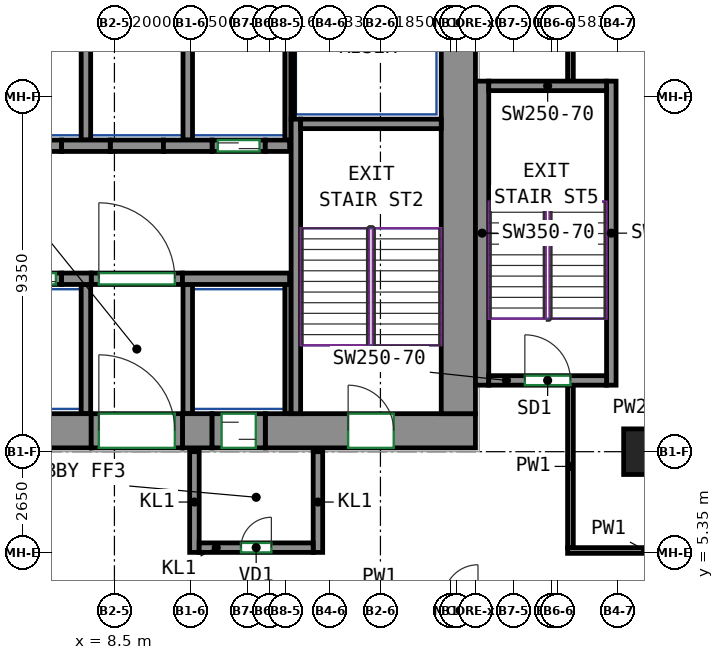
"""IFC4 building model, lengths in metres.
Left out: names, types, materials, properties, quantities, classifications, styles, units other than length and angle.
Written with IfcOpenShell. Run it as: python <this file> out.ifc"""

import sys

from ifc_helpers import new_model, si_unit, direction, frame, frame_2d, origin, origin_2d, place, context, subcontext, project, spatial, rectangle, extrude, source, transform, mapped, element, fill, save


model = new_model("IFC4")
c1 = context("Model", 3, precision=1e-05, world=origin(), true_north=direction((0.0, 1.0)))
c2 = subcontext(c1, "Body", "Model", "MODEL_VIEW")
j1 = project(units=[si_unit("LENGTHUNIT", "METRE"), si_unit("PLANEANGLEUNIT", "RADIAN")], contexts=[c1])
p1 = place(None, origin())
s1 = spatial("IfcSite", under=j1, at=p1, CompositionType="ELEMENT")
p2 = place(p1, origin())
s2 = spatial("IfcBuilding", under=s1, at=p2, CompositionType="ELEMENT")
p3 = place(p2, frame((0.0, 0.0, 112.6)))
s3 = spatial("IfcBuildingStorey", under=s2, at=p3, CompositionType="ELEMENT", Elevation=112.6)
m1 = source(origin(), c2, "Body", "SweptSolid", [
    extrude(rectangle(XDim=1.2, YDim=1.2, at=origin_2d()), origin(), (0.0, 0.0, 1.0), 3.72),
])
p4 = place(p3, frame((22.5, 8.0, 0.0), z_axis=(0.0, 0.0, 1.0), x_axis=(1.0, 0.0, 0.0)))
e1 = element("IfcColumn", 1, at=p4, inside=s3, PredefinedType="COLUMN", context=c2, shape_type="MappedRepresentation", body=[
    mapped(m1, transform((0.0, 0.0, 0.0))),
])
m2 = source(origin(), c2, "Body", "SweptSolid", [
    extrude(rectangle(XDim=14.18, YDim=0.9, at=frame_2d((7.09, 0.0))), origin(), (0.0, 0.0, 1.0), 3.72),
])
p5 = place(p3, frame((-6.29, 8.55, 0.0), z_axis=(0.0, 0.0, 1.0), x_axis=(1.0, 0.0, 0.0)))
e2 = element("IfcWall", 2, at=p5, inside=s3, PredefinedType="SHEAR", context=c2, shape_type="MappedRepresentation", body=[
    mapped(m2, transform((0.0, 0.0, 0.0))),
])
m3 = source(origin(), c2, "Body", "SweptSolid", [
    extrude(rectangle(XDim=0.78, YDim=0.9, at=frame_2d((0.39, 0.0))), origin(), (0.0, 0.0, 1.0), 3.72),
])
p6 = place(p3, frame((10.29, 8.55, 0.0), z_axis=(0.0, 0.0, 1.0), x_axis=(1.0, 0.0, 0.0)))
e3 = element("IfcWall", 3, at=p6, inside=s3, PredefinedType="SHEAR", context=c2, shape_type="MappedRepresentation", body=[
    mapped(m3, transform((0.0, 0.0, 0.0))),
])
m4 = source(origin(), c2, "Body", "SweptSolid", [
    extrude(rectangle(XDim=5.53, YDim=0.9, at=frame_2d((2.765, 0.0))), origin(), (0.0, 0.0, 1.0), 3.72),
])
p7 = place(p3, frame((12.47, 8.55, 0.0), z_axis=(0.0, 0.0, 1.0), x_axis=(1.0, 0.0, 0.0)))
e4 = element("IfcWall", 4, at=p7, inside=s3, PredefinedType="SHEAR", context=c2, shape_type="MappedRepresentation", body=[
    mapped(m4, transform((0.0, 0.0, 0.0))),
])
p8 = place(p7, frame((2.18, 0.0, 0.0)))
e5 = element("IfcOpeningElement", 5, at=p8, cuts=e4, PredefinedType="OPENING", context=c2, shape_type="SweptSolid", body=[
    extrude(rectangle(XDim=1.2, YDim=2.1, at=frame_2d((0.6, 1.05))), frame((0.0, 0.46, 0.0), z_axis=(0.0, -1.0, 0.0), x_axis=(1.0, 0.0, 0.0)), (0.0, 0.0, 1.0), 0.92),
])
m5 = source(origin(), c2, "Body", "SweptSolid", [
    extrude(rectangle(XDim=12.0, YDim=0.9, at=frame_2d((6.0, 0.0))), origin(), (0.0, 0.0, 1.0), 3.72),
])
p9 = place(p3, frame((17.55, 9.0, 0.0), z_axis=(0.0, 0.0, 1.0), x_axis=(0.0, 1.0, 0.0)))
e6 = element("IfcWall", 6, at=p9, inside=s3, PredefinedType="SHEAR", context=c2, shape_type="MappedRepresentation", body=[
    mapped(m5, transform((0.0, 0.0, 0.0))),
])
m6 = source(origin(), c2, "Body", "SweptSolid", [
    extrude(rectangle(XDim=7.75, YDim=0.25, at=frame_2d((3.875, 0.0))), origin(), (0.0, 0.0, 1.0), 3.72),
])
p10 = place(p3, frame((13.275, 9.0, 0.0), z_axis=(0.0, 0.0, 1.0), x_axis=(0.0, 1.0, 0.0)))
e7 = element("IfcWall", 7, at=p10, inside=s3, PredefinedType="SHEAR", context=c2, shape_type="MappedRepresentation", body=[
    mapped(m6, transform((0.0, 0.0, 0.0))),
])
m7 = source(origin(), c2, "Body", "SweptSolid", [
    extrude(rectangle(XDim=3.7, YDim=0.25, at=frame_2d((1.85, 0.0))), origin(), (0.0, 0.0, 1.0), 3.72),
])
p11 = place(p3, frame((13.4, 16.625, 0.0), z_axis=(0.0, 0.0, 1.0), x_axis=(1.0, 0.0, 0.0)))
e8 = element("IfcWall", 8, at=p11, inside=s3, PredefinedType="SHEAR", context=c2, shape_type="MappedRepresentation", body=[
    mapped(m7, transform((0.0, 0.0, 0.0))),
])
m8 = source(origin(), c2, "Body", "SweptSolid", [
    extrude(rectangle(XDim=8.0, YDim=0.35, at=frame_2d((4.0, 0.0))), origin(), (0.0, 0.0, 1.0), 3.72),
])
p12 = place(p3, frame((18.175, 9.75, 0.0), z_axis=(0.0, 0.0, 1.0), x_axis=(0.0, 1.0, 0.0)))
e9 = element("IfcWall", 9, at=p12, inside=s3, PredefinedType="SHEAR", context=c2, shape_type="MappedRepresentation", body=[
    mapped(m8, transform((0.0, 0.0, 0.0))),
])
m9 = source(origin(), c2, "Body", "SweptSolid", [
    extrude(rectangle(XDim=8.0, YDim=0.25, at=frame_2d((4.0, 0.0))), origin(), (0.0, 0.0, 1.0), 3.72),
])
p13 = place(p3, frame((21.575, 9.75, 0.0), z_axis=(0.0, 0.0, 1.0), x_axis=(0.0, 1.0, 0.0)))
e10 = element("IfcWall", 10, at=p13, inside=s3, PredefinedType="SHEAR", context=c2, shape_type="MappedRepresentation", body=[
    mapped(m9, transform((0.0, 0.0, 0.0))),
])
m10 = source(origin(), c2, "Body", "SweptSolid", [
    extrude(rectangle(XDim=3.1, YDim=0.25, at=frame_2d((1.55, 0.0))), origin(), (0.0, 0.0, 1.0), 3.72),
])
p14 = place(p3, frame((18.35, 9.875, 0.0), z_axis=(0.0, 0.0, 1.0), x_axis=(1.0, 0.0, 0.0)))
e11 = element("IfcWall", 11, at=p14, inside=s3, PredefinedType="SHEAR", context=c2, shape_type="MappedRepresentation", body=[
    mapped(m10, transform((0.0, 0.0, 0.0))),
])
p15 = place(p14, frame((0.95, 0.0, 0.0)))
e12 = element("IfcOpeningElement", 12, at=p15, cuts=e11, PredefinedType="OPENING", context=c2, shape_type="SweptSolid", body=[
    extrude(rectangle(XDim=1.2, YDim=2.1, at=frame_2d((0.6, 1.05))), frame((0.0, 0.135, 0.0), z_axis=(0.0, -1.0, 0.0), x_axis=(1.0, 0.0, 0.0)), (0.0, 0.0, 1.0), 0.27),
])
p16 = place(p3, frame((18.35, 17.625, 0.0), z_axis=(0.0, 0.0, 1.0), x_axis=(1.0, 0.0, 0.0)))
e13 = element("IfcWall", 13, at=p16, inside=s3, PredefinedType="SHEAR", context=c2, shape_type="MappedRepresentation", body=[
    mapped(m10, transform((0.0, 0.0, 0.0))),
])
m11 = source(origin(), c2, "Body", "SweptSolid", [
    extrude(rectangle(XDim=0.78, YDim=0.3, at=frame_2d((0.39, 0.0))), origin(), (0.0, 0.0, 1.0), 3.72),
])
p17 = place(p3, frame((7.11, 12.55, 0.0), z_axis=(0.0, 0.0, 1.0), x_axis=(1.0, 0.0, 0.0)))
e14 = element("IfcWall", 14, at=p17, inside=s3, PredefinedType="SHEAR", context=c2, shape_type="MappedRepresentation", body=[
    mapped(m11, transform((0.0, 0.0, 0.0))),
])
m12 = source(origin(), c2, "Body", "SweptSolid", [
    extrude(rectangle(XDim=2.82, YDim=0.3, at=frame_2d((1.41, 0.0))), origin(), (0.0, 0.0, 1.0), 3.72),
])
p18 = place(p3, frame((10.29, 12.55, 0.0), z_axis=(0.0, 0.0, 1.0), x_axis=(1.0, 0.0, 0.0)))
e15 = element("IfcWall", 15, at=p18, inside=s3, PredefinedType="SHEAR", context=c2, shape_type="MappedRepresentation", body=[
    mapped(m12, transform((0.0, 0.0, 0.0))),
])
m13 = source(origin(), c2, "Body", "SweptSolid", [
    extrude(rectangle(XDim=1.28, YDim=0.3, at=frame_2d((0.64, 0.0))), origin(), (0.0, 0.0, 1.0), 3.72),
])
p19 = place(p3, frame((7.11, 16.05, 0.0), z_axis=(0.0, 0.0, 1.0), x_axis=(1.0, 0.0, 0.0)))
e16 = element("IfcWall", 16, at=p19, inside=s3, PredefinedType="SHEAR", context=c2, shape_type="MappedRepresentation", body=[
    mapped(m13, transform((0.0, 0.0, 0.0))),
])
m14 = source(origin(), c2, "Body", "SweptSolid", [
    extrude(rectangle(XDim=1.28, YDim=0.3, at=frame_2d((0.64, 0.0))), origin(), (0.0, 0.0, 1.0), 3.72),
])
p20 = place(p3, frame((9.79, 16.05, 0.0), z_axis=(0.0, 0.0, 1.0), x_axis=(1.0, 0.0, 0.0)))
e17 = element("IfcWall", 17, at=p20, inside=s3, PredefinedType="SHEAR", context=c2, shape_type="MappedRepresentation", body=[
    mapped(m14, transform((0.0, 0.0, 0.0))),
])
m15 = source(origin(), c2, "Body", "SweptSolid", [
    extrude(rectangle(XDim=0.64, YDim=0.3, at=frame_2d((0.32, 0.0))), origin(), (0.0, 0.0, 1.0), 3.72),
])
p21 = place(p3, frame((12.47, 16.05, 0.0), z_axis=(0.0, 0.0, 1.0), x_axis=(1.0, 0.0, 0.0)))
e18 = element("IfcWall", 18, at=p21, inside=s3, PredefinedType="SHEAR", context=c2, shape_type="MappedRepresentation", body=[
    mapped(m15, transform((0.0, 0.0, 0.0))),
])
m16 = source(origin(), c2, "Body", "SweptSolid", [
    extrude(rectangle(XDim=1.4, YDim=0.3, at=frame_2d((0.7, 0.0))), origin(), (0.0, 0.0, 1.0), 3.72),
])
p22 = place(p3, frame((5.71, 12.55, 0.0), z_axis=(0.0, 0.0, 1.0), x_axis=(1.0, 0.0, 0.0)))
e19 = element("IfcWall", 19, at=p22, inside=s3, PredefinedType="PARTITIONING", context=c2, shape_type="MappedRepresentation", body=[
    mapped(m16, transform((0.0, 0.0, 0.0))),
])
p23 = place(p22, frame((0.15, 0.0, 0.0)))
e20 = element("IfcOpeningElement", 20, at=p23, cuts=e19, PredefinedType="OPENING", context=c2, shape_type="SweptSolid", body=[
    extrude(rectangle(XDim=1.1, YDim=2.1, at=frame_2d((0.55, 1.05))), frame((0.0, 0.16, 0.0), z_axis=(0.0, -1.0, 0.0), x_axis=(1.0, 0.0, 0.0)), (0.0, 0.0, 1.0), 0.32),
])
m17 = source(origin(), c2, "Body", "SweptSolid", [
    extrude(rectangle(XDim=1.4, YDim=0.3, at=frame_2d((0.7, 0.0))), origin(), (0.0, 0.0, 1.0), 3.72),
])
p24 = place(p3, frame((11.07, 16.05, 0.0), z_axis=(0.0, 0.0, 1.0), x_axis=(1.0, 0.0, 0.0)))
e21 = element("IfcWall", 21, at=p24, inside=s3, PredefinedType="PARTITIONING", context=c2, shape_type="MappedRepresentation", body=[
    mapped(m17, transform((0.0, 0.0, 0.0))),
])
p25 = place(p24, frame((0.15, 0.0, 0.0)))
e22 = element("IfcOpeningElement", 22, at=p25, cuts=e21, PredefinedType="OPENING", context=c2, shape_type="SweptSolid", body=[
    extrude(rectangle(XDim=1.1, YDim=2.1, at=frame_2d((0.55, 1.05))), frame((0.0, 0.16, 0.0), z_axis=(0.0, -1.0, 0.0), x_axis=(1.0, 0.0, 0.0)), (0.0, 0.0, 1.0), 0.32),
])
m18 = source(origin(), c2, "Body", "SweptSolid", [
    extrude(rectangle(XDim=2.4, YDim=0.3, at=frame_2d((1.2, 0.0))), origin(), (0.0, 0.0, 1.0), 3.72),
])
p26 = place(p3, frame((7.89, 12.55, 0.0), z_axis=(0.0, 0.0, 1.0), x_axis=(1.0, 0.0, 0.0)))
e23 = element("IfcWall", 23, at=p26, inside=s3, PredefinedType="PARTITIONING", context=c2, shape_type="MappedRepresentation", body=[
    mapped(m18, transform((0.0, 0.0, 0.0))),
])
p27 = place(p26, frame((0.2, 0.0, 0.0)))
e24 = element("IfcOpeningElement", 24, at=p27, cuts=e23, PredefinedType="OPENING", context=c2, shape_type="SweptSolid", body=[
    extrude(rectangle(XDim=2.0, YDim=2.1, at=frame_2d((1.0, 1.05))), frame((0.0, 0.16, 0.0), z_axis=(0.0, -1.0, 0.0), x_axis=(1.0, 0.0, 0.0)), (0.0, 0.0, 1.0), 0.32),
])
for number, where, z_axis, x_axis in (
    (25, (5.71, 16.05, 0.0), (0.0, 0.0, 1.0), (1.0, 0.0, 0.0)),
    (26, (8.39, 16.05, 0.0), (0.0, 0.0, 1.0), (1.0, 0.0, 0.0)),
):
    element("IfcWall", number, at=place(p3, frame(where, z_axis=z_axis, x_axis=x_axis)), inside=s3, PredefinedType="PARTITIONING", context=c2, shape_type="MappedRepresentation", body=[
        mapped(m16, transform((0.0, 0.0, 0.0))),
    ])
m19 = source(origin(), c2, "Body", "SweptSolid", [
    extrude(rectangle(XDim=2.65, YDim=0.25, at=frame_2d((1.325, 0.0))), origin(), (0.0, 0.0, 1.0), 3.72),
])
for number, where, z_axis, x_axis in (
    (27, (10.605, 5.35, 0.0), (0.0, 0.0, 1.0), (0.0, 1.0, 0.0)),
    (28, (13.855, 5.35, 0.0), (0.0, 0.0, 1.0), (0.0, 1.0, 0.0)),
):
    element("IfcWall", number, at=place(p3, frame(where, z_axis=z_axis, x_axis=x_axis)), inside=s3, PredefinedType="PARTITIONING", context=c2, shape_type="MappedRepresentation", body=[
        mapped(m19, transform((0.0, 0.0, 0.0))),
    ])
m20 = source(origin(), c2, "Body", "SweptSolid", [
    extrude(rectangle(XDim=3.0, YDim=0.25, at=frame_2d((1.5, 0.0))), origin(), (0.0, 0.0, 1.0), 3.72),
])
p28 = place(p3, frame((10.73, 5.475, 0.0), z_axis=(0.0, 0.0, 1.0), x_axis=(1.0, 0.0, 0.0)))
e29 = element("IfcWall", 29, at=p28, inside=s3, PredefinedType="PARTITIONING", context=c2, shape_type="MappedRepresentation", body=[
    mapped(m20, transform((0.0, 0.0, 0.0))),
])
p29 = place(p28, frame((1.1, 0.0, 0.0)))
e30 = element("IfcOpeningElement", 30, at=p29, cuts=e29, PredefinedType="OPENING", context=c2, shape_type="SweptSolid", body=[
    extrude(rectangle(XDim=0.8, YDim=2.0, at=frame_2d((0.4, 1.0))), frame((0.0, 0.135, 0.0), z_axis=(0.0, -1.0, 0.0), x_axis=(1.0, 0.0, 0.0)), (0.0, 0.0, 1.0), 0.27),
])
m21 = source(origin(), c2, "Body", "SweptSolid", [
    extrude(rectangle(XDim=3.275, YDim=0.165, at=frame_2d((1.638, 0.0))), origin(), (0.0, 0.0, 1.0), 3.72),
])
p30 = place(p3, frame((13.067, 16.2, 0.0), z_axis=(0.0, 0.0, 1.0), x_axis=(0.0, 1.0, 0.0)))
e31 = element("IfcWall", 31, at=p30, inside=s3, PredefinedType="PARTITIONING", context=c2, shape_type="MappedRepresentation", body=[
    mapped(m21, transform((0.0, 0.0, 0.0))),
])
m22 = source(origin(), c2, "Body", "SweptSolid", [
    extrude(rectangle(XDim=3.275, YDim=0.25, at=frame_2d((1.638, 0.0))), origin(), (0.0, 0.0, 1.0), 3.72),
])
p31 = place(p3, frame((10.43, 16.2, 0.0), z_axis=(0.0, 0.0, 1.0), x_axis=(0.0, 1.0, 0.0)))
e32 = element("IfcWall", 32, at=p31, inside=s3, PredefinedType="PARTITIONING", context=c2, shape_type="MappedRepresentation", body=[
    mapped(m22, transform((0.0, 0.0, 0.0))),
])
m23 = source(origin(), c2, "Body", "SweptSolid", [
    extrude(rectangle(XDim=2.725, YDim=0.085, at=frame_2d((1.363, 0.0))), origin(), (0.0, 0.0, 1.0), 3.72),
])
p32 = place(p3, frame((13.192, 16.75, 0.0), z_axis=(0.0, 0.0, 1.0), x_axis=(0.0, 1.0, 0.0)))
e33 = element("IfcWall", 33, at=p32, inside=s3, PredefinedType="PARTITIONING", context=c2, shape_type="MappedRepresentation", body=[
    mapped(m23, transform((0.0, 0.0, 0.0))),
])
p33 = place(p3, frame((7.75, 16.2, 0.0), z_axis=(0.0, 0.0, 1.0), x_axis=(0.0, 1.0, 0.0)))
e34 = element("IfcWall", 34, at=p33, inside=s3, PredefinedType="PARTITIONING", context=c2, shape_type="MappedRepresentation", body=[
    mapped(m22, transform((0.0, 0.0, 0.0))),
])
m24 = source(origin(), c2, "Body", "SweptSolid", [
    extrude(rectangle(XDim=3.4, YDim=0.25, at=frame_2d((1.7, 0.0))), origin(), (0.0, 0.0, 1.0), 3.72),
])
p34 = place(p3, frame((10.43, 9.0, 0.0), z_axis=(0.0, 0.0, 1.0), x_axis=(0.0, 1.0, 0.0)))
e35 = element("IfcWall", 35, at=p34, inside=s3, PredefinedType="PARTITIONING", context=c2, shape_type="MappedRepresentation", body=[
    mapped(m24, transform((0.0, 0.0, 0.0))),
])
m25 = source(origin(), c2, "Body", "SweptSolid", [
    extrude(rectangle(XDim=3.4, YDim=0.165, at=frame_2d((1.7, 0.0))), origin(), (0.0, 0.0, 1.0), 3.72),
])
p35 = place(p3, frame((13.067, 9.0, 0.0), z_axis=(0.0, 0.0, 1.0), x_axis=(0.0, 1.0, 0.0)))
e36 = element("IfcWall", 36, at=p35, inside=s3, PredefinedType="PARTITIONING", context=c2, shape_type="MappedRepresentation", body=[
    mapped(m25, transform((0.0, 0.0, 0.0))),
])
p36 = place(p3, frame((7.75, 9.0, 0.0), z_axis=(0.0, 0.0, 1.0), x_axis=(0.0, 1.0, 0.0)))
e37 = element("IfcWall", 37, at=p36, inside=s3, PredefinedType="PARTITIONING", context=c2, shape_type="MappedRepresentation", body=[
    mapped(m24, transform((0.0, 0.0, 0.0))),
])
m26 = source(origin(), c2, "Body", "SweptSolid", [
    extrude(rectangle(XDim=2.4, YDim=0.9, at=frame_2d((1.2, 0.0))), origin(), (0.0, 0.0, 1.0), 2.7),
])
p37 = place(p3, frame((7.89, 8.55, 0.0), z_axis=(0.0, 0.0, 1.0), x_axis=(1.0, 0.0, 0.0)))
e38 = element("IfcWall", 38, at=p37, inside=s3, PredefinedType="PARTITIONING", context=c2, shape_type="MappedRepresentation", body=[
    mapped(m26, transform((0.0, 0.0, 0.0))),
])
p38 = place(p37, frame((0.2, 0.0, 0.0)))
e39 = element("IfcOpeningElement", 39, at=p38, cuts=e38, PredefinedType="OPENING", context=c2, shape_type="SweptSolid", body=[
    extrude(rectangle(XDim=2.0, YDim=2.1, at=frame_2d((1.0, 1.05))), frame((0.0, 0.46, 0.0), z_axis=(0.0, -1.0, 0.0), x_axis=(1.0, 0.0, 0.0)), (0.0, 0.0, 1.0), 0.92),
])
m27 = source(origin(), c2, "Body", "SweptSolid", [
    extrude(rectangle(XDim=1.4, YDim=0.9, at=frame_2d((0.7, 0.0))), origin(), (0.0, 0.0, 1.0), 2.7),
])
p39 = place(p3, frame((11.07, 8.55, 0.0), z_axis=(0.0, 0.0, 1.0), x_axis=(1.0, 0.0, 0.0)))
e40 = element("IfcWall", 40, at=p39, inside=s3, PredefinedType="PARTITIONING", context=c2, shape_type="MappedRepresentation", body=[
    mapped(m27, transform((0.0, 0.0, 0.0))),
])
p40 = place(p39, frame((0.25, 0.0, 0.0)))
e41 = element("IfcOpeningElement", 41, at=p40, cuts=e40, PredefinedType="OPENING", context=c2, shape_type="SweptSolid", body=[
    extrude(rectangle(XDim=0.9, YDim=2.1, at=frame_2d((0.45, 1.05))), frame((0.0, 0.46, 0.0), z_axis=(0.0, -1.0, 0.0), x_axis=(1.0, 0.0, 0.0)), (0.0, 0.0, 1.0), 0.92),
])
p41 = place(p3, frame((20.5, 17.75, 0.0), z_axis=(0.0, 0.0, 1.0), x_axis=(0.0, 1.0, 0.0)))
e42 = element("IfcWall", 42, at=p41, inside=s3, PredefinedType="PARTITIONING", context=c2, shape_type="SweptSolid", body=[
    extrude(rectangle(XDim=4.16, YDim=0.15, at=frame_2d((2.08, 0.0))), origin(), (0.0, 0.0, 1.0), 3.72),
])
p42 = place(p3, frame((20.5, 5.475, 0.0), z_axis=(0.0, 0.0, 1.0), x_axis=(0.0, 1.0, 0.0)))
e43 = element("IfcWall", 43, at=p42, inside=s3, PredefinedType="PARTITIONING", context=c2, shape_type="SweptSolid", body=[
    extrude(rectangle(XDim=4.275, YDim=0.15, at=frame_2d((2.137, 0.0))), origin(), (0.0, 0.0, 1.0), 3.72),
])
p43 = place(p3, frame((20.425, 5.4, 0.0), z_axis=(0.0, 0.0, 1.0), x_axis=(1.0, 0.0, 0.0)))
e44 = element("IfcWall", 44, at=p43, inside=s3, PredefinedType="PARTITIONING", context=c2, shape_type="SweptSolid", body=[
    extrude(rectangle(XDim=6.85, YDim=0.15, at=frame_2d((3.425, 0.0))), origin(), (0.0, 0.0, 1.0), 3.72),
])
p44 = place(p43, frame((2.752, 0.0, 0.0)))
e45 = element("IfcOpeningElement", 45, at=p44, cuts=e44, PredefinedType="OPENING", context=c2, shape_type="SweptSolid", body=[
    extrude(rectangle(XDim=1.0, YDim=2.1, at=frame_2d((0.5, 1.05))), frame((0.0, 0.085, 0.0), z_axis=(0.0, -1.0, 0.0), x_axis=(1.0, 0.0, 0.0)), (0.0, 0.0, 1.0), 0.17),
])
p45 = place(p27, origin())
e46 = element("IfcDoor", 46, at=p45, inside=s3, OperationType="DOUBLE_DOOR_SINGLE_SWING", PredefinedType="DOOR", context=c2, shape_type="SweptSolid", body=[
    extrude(rectangle(XDim=2.0, YDim=2.1, at=frame_2d((1.0, 1.05))), frame((0.0, 0.025, 0.0), z_axis=(0.0, -1.0, 0.0), x_axis=(1.0, 0.0, 0.0)), (0.0, 0.0, 1.0), 0.05),
])
fill(e24, e46)
p46 = place(p38, origin())
e47 = element("IfcDoor", 47, at=p46, inside=s3, OperationType="DOUBLE_DOOR_SINGLE_SWING", PredefinedType="DOOR", context=c2, shape_type="SweptSolid", body=[
    extrude(rectangle(XDim=2.0, YDim=2.1, at=frame_2d((1.0, 1.05))), frame((0.0, 0.355, 0.0), z_axis=(0.0, -1.0, 0.0), x_axis=(1.0, 0.0, 0.0)), (0.0, 0.0, 1.0), 0.05),
])
fill(e39, e47)
p47 = place(p29, origin())
e48 = element("IfcDoor", 48, at=p47, inside=s3, OperationType="SINGLE_SWING_RIGHT", PredefinedType="DOOR", context=c2, shape_type="SweptSolid", body=[
    extrude(rectangle(XDim=0.8, YDim=2.0, at=frame_2d((0.4, 1.0))), frame((0.0, 0.025, 0.0), z_axis=(0.0, -1.0, 0.0), x_axis=(1.0, 0.0, 0.0)), (0.0, 0.0, 1.0), 0.05),
])
fill(e30, e48)
p48 = place(p40, origin())
e49 = element("IfcDoor", 49, at=p48, inside=s3, OperationType="SLIDING_TO_LEFT", PredefinedType="DOOR", context=c2, shape_type="SweptSolid", body=[
    extrude(rectangle(XDim=0.9, YDim=2.1, at=frame_2d((0.45, 1.05))), frame((0.0, 0.355, 0.0), z_axis=(0.0, -1.0, 0.0), x_axis=(1.0, 0.0, 0.0)), (0.0, 0.0, 1.0), 0.05),
])
fill(e41, e49)
p49 = place(p23, origin())
e50 = element("IfcDoor", 50, at=p49, inside=s3, OperationType="DOUBLE_DOOR_SLIDING", PredefinedType="DOOR", context=c2, shape_type="SweptSolid", body=[
    extrude(rectangle(XDim=1.1, YDim=2.1, at=frame_2d((0.55, 1.05))), frame((0.0, 0.025, 0.0), z_axis=(0.0, -1.0, 0.0), x_axis=(1.0, 0.0, 0.0)), (0.0, 0.0, 1.0), 0.05),
])
fill(e20, e50)
p50 = place(p25, origin())
e51 = element("IfcDoor", 51, at=p50, inside=s3, OperationType="DOUBLE_DOOR_SLIDING", PredefinedType="DOOR", context=c2, shape_type="SweptSolid", body=[
    extrude(rectangle(XDim=1.1, YDim=2.1, at=frame_2d((0.55, 1.05))), frame((0.0, 0.025, 0.0), z_axis=(0.0, -1.0, 0.0), x_axis=(1.0, 0.0, 0.0)), (0.0, 0.0, 1.0), 0.05),
])
fill(e22, e51)
p51 = place(p8, origin())
e52 = element("IfcDoor", 52, at=p51, inside=s3, OperationType="DOUBLE_DOOR_SINGLE_SWING", PredefinedType="DOOR", context=c2, shape_type="SweptSolid", body=[
    extrude(rectangle(XDim=1.2, YDim=2.1, at=frame_2d((0.6, 1.05))), frame((0.0, 0.355, 0.0), z_axis=(0.0, -1.0, 0.0), x_axis=(1.0, 0.0, 0.0)), (0.0, 0.0, 1.0), 0.05),
])
fill(e5, e52)
p52 = place(p15, origin())
e53 = element("IfcDoor", 53, at=p52, inside=s3, OperationType="DOUBLE_DOOR_SINGLE_SWING", PredefinedType="DOOR", context=c2, shape_type="SweptSolid", body=[
    extrude(rectangle(XDim=1.2, YDim=2.1, at=frame_2d((0.6, 1.05))), frame((0.0, 0.025, 0.0), z_axis=(0.0, -1.0, 0.0), x_axis=(1.0, 0.0, 0.0)), (0.0, 0.0, 1.0), 0.05),
])
fill(e12, e53)
save(model, sys.argv[1])
